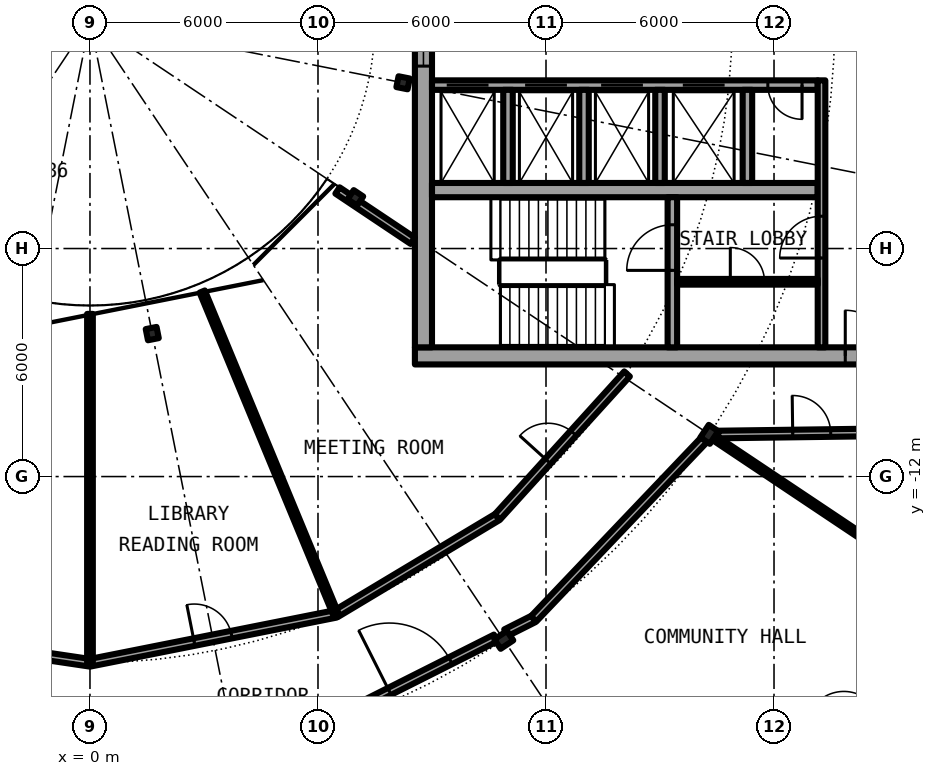
"""IFC4 building model, lengths in metres.
Left out: names, types, materials, properties, quantities, classifications, styles, units other than length and angle.
Written with IfcOpenShell. Run it as: python <this file> out.ifc"""

import sys

from ifc_helpers import new_model, si_unit, direction, frame, frame_2d, origin, origin_2d, place, context, subcontext, project, spatial, rectangle, i_section, extrude, element, fill, save


model = new_model("IFC4")
c1 = context("Model", 3, precision=1e-05, world=origin(), true_north=direction((0.0, 1.0)))
c2 = subcontext(c1, "Body", "Model", "MODEL_VIEW")
j1 = project(units=[si_unit("LENGTHUNIT", "METRE"), si_unit("PLANEANGLEUNIT", "RADIAN")], contexts=[c1])
p1 = place(None, origin())
s1 = spatial("IfcSite", under=j1, at=p1, CompositionType="ELEMENT")
p2 = place(p1, origin())
s2 = spatial("IfcBuilding", under=s1, at=p2, CompositionType="ELEMENT")
p3 = place(p2, frame((0.0, 0.0, 208.5)))
s3 = spatial("IfcBuildingStorey", under=s2, at=p3, CompositionType="ELEMENT", Elevation=208.5)
for number, where, z_axis, x_axis in (
    (1, (10.889, -16.297, 0.0), (0.0, 0.0, 1.0), (0.556, -0.831, 0.0)),
    (2, (16.297, -10.889, 0.0), (0.0, 0.0, 1.0), (0.831, -0.556, 0.0)),
):
    element("IfcColumn", number, at=place(p3, frame(where, z_axis=z_axis, x_axis=x_axis)), inside=s3, PredefinedType="COLUMN", context=c2, shape_type="SweptSolid", body=[
        extrude(i_section(OverallWidth=0.3, OverallDepth=0.4, WebThickness=0.013, FlangeThickness=0.024, FilletRadius=0.027, at=origin_2d()), origin(), (0.0, 0.0, 1.0), 4.2),
    ])
for number, where, z_axis, x_axis in (
    (3, (1.639, -8.239, 0.0), (0.0, 0.0, 1.0), (0.195, -0.981, 0.0)),
    (4, (6.984, -4.667, 0.0), (0.0, 0.0, 1.0), (0.831, -0.556, 0.0)),
    (5, (8.239, -1.639, 0.0), (0.0, 0.0, 1.0), (0.981, -0.195, 0.0)),
):
    element("IfcColumn", number, at=place(p3, frame(where, z_axis=z_axis, x_axis=x_axis)), inside=s3, PredefinedType="COLUMN", context=c2, shape_type="SweptSolid", body=[
        extrude(i_section(OverallWidth=0.3, OverallDepth=0.29, WebThickness=0.009, FlangeThickness=0.014, FilletRadius=0.027, at=origin_2d()), origin(), (0.0, 0.0, 1.0), 4.2),
    ])
p4 = place(p3, frame((19.304, -19.304, 0.0), z_axis=(0.0, 0.0, 1.0), x_axis=(0.634382322723, 0.773019449054, 0.0)))
e6 = element("IfcWall", 6, at=p4, inside=s3, PredefinedType="SOLIDWALL", context=c2, shape_type="SweptSolid", body=[
    extrude(rectangle(XDim=5.352, YDim=0.25, at=frame_2d((2.676, 0.0))), origin(), (0.0, 0.0, 1.0), 3.85),
])
p5 = place(p4, frame((0.841, 0.0, 0.0)))
e7 = element("IfcOpeningElement", 7, at=p5, cuts=e6, PredefinedType="OPENING", context=c2, shape_type="SweptSolid", body=[
    extrude(rectangle(XDim=1.0, YDim=2.2, at=frame_2d((0.5, 1.1))), frame((0.0, 0.135, 0.0), z_axis=(0.0, -1.0, 0.0), x_axis=(1.0, 0.0, 0.0)), (0.0, 0.0, 1.0), 0.27),
])
p6 = place(p4, frame((3.51, 0.0, 0.0)))
e8 = element("IfcOpeningElement", 8, at=p6, cuts=e6, PredefinedType="OPENING", context=c2, shape_type="SweptSolid", body=[
    extrude(rectangle(XDim=1.0, YDim=2.2, at=frame_2d((0.5, 1.1))), frame((0.0, 0.135, 0.0), z_axis=(0.0, -1.0, 0.0), x_axis=(1.0, 0.0, 0.0)), (0.0, 0.0, 1.0), 0.27),
])
p7 = place(p3, frame((8.55, -8.825, 0.0), z_axis=(0.0, 0.0, 1.0), x_axis=(1.0, 0.0, 0.0)))
e9 = element("IfcWall", 9, at=p7, inside=s3, PredefinedType="SHEAR", context=c2, shape_type="SweptSolid", body=[
    extrude(rectangle(XDim=13.5, YDim=0.45, at=frame_2d((6.75, 0.0))), origin(), (0.0, 0.0, 1.0), 4.2),
])
p8 = place(p7, frame((11.325, 0.0, 0.0)))
e10 = element("IfcOpeningElement", 10, at=p8, cuts=e9, PredefinedType="OPENING", context=c2, shape_type="SweptSolid", body=[
    extrude(rectangle(XDim=1.2, YDim=2.3, at=frame_2d((0.6, 1.15))), frame((0.0, 0.235, 0.0), z_axis=(0.0, -1.0, 0.0), x_axis=(1.0, 0.0, 0.0)), (0.0, 0.0, 1.0), 0.47),
])
p9 = place(p3, frame((8.775, -8.6, 0.0), z_axis=(0.0, 0.0, 1.0), x_axis=(0.0, 1.0, 0.0)))
e11 = element("IfcWall", 11, at=p9, inside=s3, PredefinedType="SHEAR", context=c2, shape_type="SweptSolid", body=[
    extrude(rectangle(XDim=17.2, YDim=0.45, at=frame_2d((8.6, 0.0))), origin(), (0.0, 0.0, 1.0), 4.2),
])
p10 = place(p9, frame((7.4, 0.0, 0.1)))
e12 = element("IfcOpeningElement", 12, at=p10, cuts=e11, PredefinedType="OPENING", context=c2, shape_type="SweptSolid", body=[
    extrude(rectangle(XDim=2.4, YDim=2.2, at=frame_2d((1.2, 1.1))), frame((0.0, 0.235, 0.0), z_axis=(0.0, -1.0, 0.0), x_axis=(1.0, 0.0, 0.0)), (0.0, 0.0, 1.0), 0.47),
])
p11 = place(p3, frame((19.15, -1.7, 0.0), z_axis=(0.0, 0.0, 1.0), x_axis=(-1.0, 0.0, 0.0)))
e13 = element("IfcWall", 13, at=p11, inside=s3, PredefinedType="SHEAR", context=c2, shape_type="SweptSolid", body=[
    extrude(rectangle(XDim=10.15, YDim=0.25, at=frame_2d((5.075, 0.0))), origin(), (0.0, 0.0, 1.0), 4.2),
])
p12 = place(p11, frame((8.663, 0.0, 0.0)))
e14 = element("IfcOpeningElement", 14, at=p12, cuts=e13, PredefinedType="OPENING", context=c2, shape_type="SweptSolid", body=[
    extrude(rectangle(XDim=1.1, YDim=2.3, at=frame_2d((0.55, 1.15))), frame((0.0, 0.135, 0.0), z_axis=(0.0, -1.0, 0.0), x_axis=(1.0, 0.0, 0.0)), (0.0, 0.0, 1.0), 0.27),
])
p13 = place(p11, frame((6.6, 0.0, 0.0)))
e15 = element("IfcOpeningElement", 15, at=p13, cuts=e13, PredefinedType="OPENING", context=c2, shape_type="SweptSolid", body=[
    extrude(rectangle(XDim=1.1, YDim=2.3, at=frame_2d((0.55, 1.15))), frame((0.0, 0.135, 0.0), z_axis=(0.0, -1.0, 0.0), x_axis=(1.0, 0.0, 0.0)), (0.0, 0.0, 1.0), 0.27),
])
p14 = place(p11, frame((4.6, 0.0, 0.0)))
e16 = element("IfcOpeningElement", 16, at=p14, cuts=e13, PredefinedType="OPENING", context=c2, shape_type="SweptSolid", body=[
    extrude(rectangle(XDim=1.1, YDim=2.3, at=frame_2d((0.55, 1.15))), frame((0.0, 0.135, 0.0), z_axis=(0.0, -1.0, 0.0), x_axis=(1.0, 0.0, 0.0)), (0.0, 0.0, 1.0), 0.27),
])
p15 = place(p11, frame((2.45, 0.0, 0.0)))
e17 = element("IfcOpeningElement", 17, at=p15, cuts=e13, PredefinedType="OPENING", context=c2, shape_type="SweptSolid", body=[
    extrude(rectangle(XDim=1.1, YDim=2.3, at=frame_2d((0.55, 1.15))), frame((0.0, 0.135, 0.0), z_axis=(0.0, -1.0, 0.0), x_axis=(1.0, 0.0, 0.0)), (0.0, 0.0, 1.0), 0.27),
])
p16 = place(p11, frame((0.413, 0.0, 0.0)))
e18 = element("IfcOpeningElement", 18, at=p16, cuts=e13, PredefinedType="OPENING", context=c2, shape_type="SweptSolid", body=[
    extrude(rectangle(XDim=0.9, YDim=2.3, at=frame_2d((0.45, 1.15))), frame((0.0, 0.135, 0.0), z_axis=(0.0, -1.0, 0.0), x_axis=(1.0, 0.0, 0.0)), (0.0, 0.0, 1.0), 0.27),
])
p17 = place(p3, frame((9.0, -4.462, 0.0), z_axis=(0.0, 0.0, 1.0), x_axis=(1.0, 0.0, 0.0)))
e19 = element("IfcWall", 19, at=p17, inside=s3, PredefinedType="SHEAR", context=c2, shape_type="SweptSolid", body=[
    extrude(rectangle(XDim=10.15, YDim=0.375, at=frame_2d((5.075, 0.0))), origin(), (0.0, 0.0, 1.0), 4.2),
])
p18 = place(p3, frame((15.325, -8.6, 0.0), z_axis=(0.0, 0.0, 1.0), x_axis=(0.0, 1.0, 0.0)))
e20 = element("IfcWall", 20, at=p18, inside=s3, PredefinedType="SHEAR", context=c2, shape_type="SweptSolid", body=[
    extrude(rectangle(XDim=3.95, YDim=0.25, at=frame_2d((1.975, 0.0))), origin(), (0.0, 0.0, 1.0), 4.2),
])
p19 = place(p18, frame((2.025, 0.0, 0.0)))
e21 = element("IfcOpeningElement", 21, at=p19, cuts=e20, PredefinedType="OPENING", context=c2, shape_type="SweptSolid", body=[
    extrude(rectangle(XDim=1.2, YDim=2.3, at=frame_2d((0.6, 1.15))), frame((0.0, 0.135, 0.0), z_axis=(0.0, -1.0, 0.0), x_axis=(1.0, 0.0, 0.0)), (0.0, 0.0, 1.0), 0.27),
])
for number, where, z_axis, x_axis in (
    (22, (15.0, -1.825, 0.0), (0.0, 0.0, 1.0), (0.0, -1.0, 0.0)),
    (23, (17.3, -1.825, 0.0), (0.0, 0.0, 1.0), (0.0, -1.0, 0.0)),
):
    element("IfcWall", number, at=place(p3, frame(where, z_axis=z_axis, x_axis=x_axis)), inside=s3, PredefinedType="SOLIDWALL", context=c2, shape_type="SweptSolid", body=[
        extrude(rectangle(XDim=2.45, YDim=0.25, at=frame_2d((1.225, 0.0))), origin(), (0.0, 0.0, 1.0), 3.85),
    ])
p20 = place(p3, frame((19.25, -8.6, 0.0), z_axis=(0.0, 0.0, 1.0), x_axis=(0.0, 1.0, 0.0)))
e24 = element("IfcWall", 24, at=p20, inside=s3, PredefinedType="SOLIDWALL", context=c2, shape_type="SweptSolid", body=[
    extrude(rectangle(XDim=7.025, YDim=0.2, at=frame_2d((3.513, 0.0))), origin(), (0.0, 0.0, 1.0), 3.85),
])
p21 = place(p20, frame((2.35, 0.0, 0.0)))
e25 = element("IfcOpeningElement", 25, at=p21, cuts=e24, PredefinedType="OPENING", context=c2, shape_type="SweptSolid", body=[
    extrude(rectangle(XDim=1.1, YDim=2.3, at=frame_2d((0.55, 1.15))), frame((0.0, 0.11, 0.0), z_axis=(0.0, -1.0, 0.0), x_axis=(1.0, 0.0, 0.0)), (0.0, 0.0, 1.0), 0.22),
])
for number, where, z_axis, x_axis in (
    (26, (11.0, -1.825, 0.0), (0.0, 0.0, 1.0), (0.0, -1.0, 0.0)),
    (27, (13.0, -1.825, 0.0), (0.0, 0.0, 1.0), (0.0, -1.0, 0.0)),
):
    element("IfcWall", number, at=place(p3, frame(where, z_axis=z_axis, x_axis=x_axis)), inside=s3, PredefinedType="SOLIDWALL", context=c2, shape_type="SweptSolid", body=[
        extrude(rectangle(XDim=2.45, YDim=0.25, at=frame_2d((1.225, 0.0))), origin(), (0.0, 0.0, 1.0), 3.85),
    ])
p22 = place(p3, frame((15.45, -6.875, 0.0), z_axis=(0.0, 0.0, 1.0), x_axis=(1.0, 0.0, 0.0)))
e28 = element("IfcWall", 28, at=p22, inside=s3, PredefinedType="PARTITIONING", context=c2, shape_type="SweptSolid", body=[
    extrude(rectangle(XDim=3.7, YDim=0.15, at=frame_2d((1.85, 0.0))), origin(), (0.0, 0.0, 1.0), 3.85),
])
p23 = place(p22, frame((1.4, 0.0, 0.0)))
e29 = element("IfcOpeningElement", 29, at=p23, cuts=e28, PredefinedType="OPENING", context=c2, shape_type="SweptSolid", body=[
    extrude(rectangle(XDim=0.9, YDim=2.3, at=frame_2d((0.45, 1.15))), frame((0.0, 0.085, 0.0), z_axis=(0.0, -1.0, 0.0), x_axis=(1.0, 0.0, 0.0)), (0.0, 0.0, 1.0), 0.17),
])
p24 = place(p3, frame((5.69, -18.756, 0.0), z_axis=(0.0, 0.0, 1.0), x_axis=(0.893242938285, 0.449574302206, 0.0)))
e30 = element("IfcWall", 30, at=p24, inside=s3, PredefinedType="PARTITIONING", context=c2, shape_type="SweptSolid", body=[
    extrude(rectangle(XDim=5.581, YDim=0.2, at=frame_2d((2.791, 0.0))), origin(), (0.0, 0.0, 1.0), 3.6),
])
p25 = place(p24, frame((2.451, 0.0, 0.0)))
e31 = element("IfcOpeningElement", 31, at=p25, cuts=e30, PredefinedType="OPENING", context=c2, shape_type="SweptSolid", body=[
    extrude(rectangle(XDim=1.8, YDim=2.3, at=frame_2d((0.9, 1.15))), frame((0.0, 0.11, 0.0), z_axis=(0.0, -1.0, 0.0), x_axis=(1.0, 0.0, 0.0)), (0.0, 0.0, 1.0), 0.22),
])
p26 = place(p3, frame((10.945, -16.111, 0.0), z_axis=(0.0, 0.0, 1.0), x_axis=(0.893110817984, 0.449836711263, 0.0)))
e32 = element("IfcWall", 32, at=p26, inside=s3, PredefinedType="PARTITIONING", context=c2, shape_type="SweptSolid", body=[
    extrude(rectangle(XDim=0.818, YDim=0.2, at=frame_2d((0.409, 0.0))), origin(), (0.0, 0.0, 1.0), 3.85),
])
p27 = place(p3, frame((11.676, -15.743, 0.0), z_axis=(0.0, 0.0, 1.0), x_axis=(0.689484820725, 0.724300132535, 0.0)))
e33 = element("IfcWall", 33, at=p27, inside=s3, PredefinedType="PARTITIONING", context=c2, shape_type="SweptSolid", body=[
    extrude(rectangle(XDim=6.55, YDim=0.2, at=frame_2d((3.275, 0.0))), origin(), (0.0, 0.0, 1.0), 3.6),
])
p28 = place(p3, frame((-4.906, -16.172, 0.0), z_axis=(0.0, 0.0, 1.0), x_axis=(0.989175164373, -0.146739545409, 0.0)))
e34 = element("IfcWall", 34, at=p28, inside=s3, PredefinedType="PARTITIONING", context=c2, shape_type="SweptSolid", body=[
    extrude(rectangle(XDim=4.96, YDim=0.2, at=frame_2d((2.48, 0.0))), origin(), (0.0, 0.0, 1.0), 3.85),
])
p29 = place(p28, frame((1.98, 0.0, 0.0)))
e35 = element("IfcOpeningElement", 35, at=p29, cuts=e34, PredefinedType="OPENING", context=c2, shape_type="SweptSolid", body=[
    extrude(rectangle(XDim=1.0, YDim=2.3, at=frame_2d((0.5, 1.15))), frame((0.0, 0.11, 0.0), z_axis=(0.0, -1.0, 0.0), x_axis=(1.0, 0.0, 0.0)), (0.0, 0.0, 1.0), 0.22),
])
p30 = place(p3, frame((6.467, -15.614, 0.0), z_axis=(0.0, 0.0, 1.0), x_axis=(0.857696997328, 0.514155483074, 0.0)))
e36 = element("IfcWall", 36, at=p30, inside=s3, PredefinedType="PARTITIONING", context=c2, shape_type="SweptSolid", body=[
    extrude(rectangle(XDim=4.96, YDim=0.2, at=frame_2d((2.48, 0.0))), origin(), (0.0, 0.0, 1.0), 3.85),
])
p31 = place(p3, frame((10.721, -13.064, 0.0), z_axis=(0.0, 0.0, 1.0), x_axis=(0.671634030197, 0.740883074095, 0.0)))
e37 = element("IfcWall", 37, at=p31, inside=s3, PredefinedType="PARTITIONING", context=c2, shape_type="SweptSolid", body=[
    extrude(rectangle(XDim=5.08, YDim=0.2, at=frame_2d((2.54, 0.0))), origin(), (0.0, 0.0, 1.0), 3.85),
])
p32 = place(p31, frame((1.98, 0.0, 0.0)))
e38 = element("IfcOpeningElement", 38, at=p32, cuts=e37, PredefinedType="OPENING", context=c2, shape_type="SweptSolid", body=[
    extrude(rectangle(XDim=1.0, YDim=2.3, at=frame_2d((0.5, 1.15))), frame((0.0, 0.11, 0.0), z_axis=(0.0, -1.0, 0.0), x_axis=(1.0, 0.0, 0.0)), (0.0, 0.0, 1.0), 0.22),
])
p33 = place(p3, frame((0.0, -16.9, 0.0), z_axis=(0.0, 0.0, 1.0), x_axis=(0.980799374359, 0.195019453537, 0.0)))
e39 = element("IfcWall", 39, at=p33, inside=s3, PredefinedType="PARTITIONING", context=c2, shape_type="SweptSolid", body=[
    extrude(rectangle(XDim=6.594, YDim=0.2, at=frame_2d((3.297, 0.0))), origin(), (0.0, 0.0, 1.0), 3.85),
])
p34 = place(p33, frame((2.797, 0.0, 0.0)))
e40 = element("IfcOpeningElement", 40, at=p34, cuts=e39, PredefinedType="OPENING", context=c2, shape_type="SweptSolid", body=[
    extrude(rectangle(XDim=1.0, YDim=2.3, at=frame_2d((0.5, 1.15))), frame((0.0, 0.11, 0.0), z_axis=(0.0, -1.0, 0.0), x_axis=(1.0, 0.0, 0.0)), (0.0, 0.0, 1.0), 0.22),
])
p35 = place(p3, frame((16.534, -10.894, 0.0), z_axis=(0.0, 0.0, 1.0), x_axis=(0.999909707888, 0.013437859594, 0.0)))
e41 = element("IfcWall", 41, at=p35, inside=s3, PredefinedType="PARTITIONING", context=c2, shape_type="SweptSolid", body=[
    extrude(rectangle(XDim=5.142, YDim=0.2, at=frame_2d((2.571, 0.0))), origin(), (0.0, 0.0, 1.0), 3.85),
])
p36 = place(p35, frame((1.958, 0.0, 0.0)))
e42 = element("IfcOpeningElement", 42, at=p36, cuts=e41, PredefinedType="OPENING", context=c2, shape_type="SweptSolid", body=[
    extrude(rectangle(XDim=1.0, YDim=2.3, at=frame_2d((0.5, 1.15))), frame((0.0, 0.11, 0.0), z_axis=(0.0, -1.0, 0.0), x_axis=(1.0, 0.0, 0.0)), (0.0, 0.0, 1.0), 0.22),
])
p37 = place(p3, frame((6.513, -4.472, 0.0), z_axis=(0.0, 0.0, 1.0), x_axis=(0.831403409976, -0.555669299026, 0.0)))
e43 = element("IfcWall", 43, at=p37, inside=s3, PredefinedType="PARTITIONING", context=c2, shape_type="SweptSolid", body=[
    extrude(rectangle(XDim=2.383, YDim=0.2, at=frame_2d((1.191, 0.0))), origin(), (0.0, 0.0, 1.0), 3.85),
])
p38 = place(p3, frame((0.0, -16.9, 0.0), z_axis=(0.0, 0.0, 1.0), x_axis=(0.0, 1.0, 0.0)))
e44 = element("IfcWall", 44, at=p38, inside=s3, PredefinedType="PARTITIONING", context=c2, shape_type="SweptSolid", body=[
    extrude(rectangle(XDim=9.18, YDim=0.15, at=frame_2d((4.59, 0.0))), origin(), (0.0, 0.0, 1.0), 3.85),
])
p39 = place(p3, frame((2.954, -7.132, 0.0), z_axis=(0.0, 0.0, 1.0), x_axis=(0.382646942224, -0.923894646378, 0.0)))
e45 = element("IfcWall", 45, at=p39, inside=s3, PredefinedType="PARTITIONING", context=c2, shape_type="SweptSolid", body=[
    extrude(rectangle(XDim=9.181, YDim=0.15, at=frame_2d((4.59, 0.0))), origin(), (0.0, 0.0, 1.0), 3.85),
])
p40 = place(p3, frame((16.461, -11.003, 0.0), z_axis=(0.0, 0.0, 1.0), x_axis=(0.831418274402, -0.555647057933, 0.0)))
e46 = element("IfcWall", 46, at=p40, inside=s3, PredefinedType="PARTITIONING", context=c2, shape_type="SweptSolid", body=[
    extrude(rectangle(XDim=7.375, YDim=0.15, at=frame_2d((3.688, 0.0))), origin(), (0.0, 0.0, 1.0), 3.85),
])
p41 = place(p12, origin())
e47 = element("IfcDoor", 47, at=p41, inside=s3, OperationType="DOUBLE_DOOR_SLIDING", PredefinedType="DOOR", context=c2, shape_type="SweptSolid", body=[
    extrude(rectangle(XDim=1.1, YDim=2.3, at=frame_2d((0.55, 1.15))), frame((0.0, 0.025, 0.0), z_axis=(0.0, -1.0, 0.0), x_axis=(1.0, 0.0, 0.0)), (0.0, 0.0, 1.0), 0.05),
])
fill(e14, e47)
p42 = place(p13, origin())
e48 = element("IfcDoor", 48, at=p42, inside=s3, OperationType="DOUBLE_DOOR_SLIDING", PredefinedType="DOOR", context=c2, shape_type="SweptSolid", body=[
    extrude(rectangle(XDim=1.1, YDim=2.3, at=frame_2d((0.55, 1.15))), frame((0.0, 0.025, 0.0), z_axis=(0.0, -1.0, 0.0), x_axis=(1.0, 0.0, 0.0)), (0.0, 0.0, 1.0), 0.05),
])
fill(e15, e48)
p43 = place(p14, origin())
e49 = element("IfcDoor", 49, at=p43, inside=s3, OperationType="DOUBLE_DOOR_SLIDING", PredefinedType="DOOR", context=c2, shape_type="SweptSolid", body=[
    extrude(rectangle(XDim=1.1, YDim=2.3, at=frame_2d((0.55, 1.15))), frame((0.0, 0.025, 0.0), z_axis=(0.0, -1.0, 0.0), x_axis=(1.0, 0.0, 0.0)), (0.0, 0.0, 1.0), 0.05),
])
fill(e16, e49)
p44 = place(p15, origin())
e50 = element("IfcDoor", 50, at=p44, inside=s3, OperationType="DOUBLE_DOOR_SLIDING", PredefinedType="DOOR", context=c2, shape_type="SweptSolid", body=[
    extrude(rectangle(XDim=1.1, YDim=2.3, at=frame_2d((0.55, 1.15))), frame((0.0, 0.025, 0.0), z_axis=(0.0, -1.0, 0.0), x_axis=(1.0, 0.0, 0.0)), (0.0, 0.0, 1.0), 0.05),
])
fill(e17, e50)
p45 = place(p16, origin())
e51 = element("IfcDoor", 51, at=p45, inside=s3, OperationType="SINGLE_SWING_RIGHT", PredefinedType="DOOR", context=c2, shape_type="SweptSolid", body=[
    extrude(rectangle(XDim=0.9, YDim=2.3, at=frame_2d((0.45, 1.15))), frame((0.0, 0.025, 0.0), z_axis=(0.0, -1.0, 0.0), x_axis=(1.0, 0.0, 0.0)), (0.0, 0.0, 1.0), 0.05),
])
fill(e18, e51)
p46 = place(p23, origin())
e52 = element("IfcDoor", 52, at=p46, inside=s3, OperationType="SINGLE_SWING_LEFT", PredefinedType="DOOR", context=c2, shape_type="SweptSolid", body=[
    extrude(rectangle(XDim=0.9, YDim=2.3, at=frame_2d((0.45, 1.15))), frame((0.0, 0.025, 0.0), z_axis=(0.0, -1.0, 0.0), x_axis=(1.0, 0.0, 0.0)), (0.0, 0.0, 1.0), 0.05),
])
fill(e29, e52)
p47 = place(p19, origin())
e53 = element("IfcDoor", 53, at=p47, inside=s3, OperationType="SINGLE_SWING_LEFT", PredefinedType="DOOR", context=c2, shape_type="SweptSolid", body=[
    extrude(rectangle(XDim=1.2, YDim=2.3, at=frame_2d((0.6, 1.15))), frame((0.0, 0.025, 0.0), z_axis=(0.0, -1.0, 0.0), x_axis=(1.0, 0.0, 0.0)), (0.0, 0.0, 1.0), 0.05),
])
fill(e21, e53)
p48 = place(p21, origin())
e54 = element("IfcDoor", 54, at=p48, inside=s3, OperationType="SINGLE_SWING_RIGHT", PredefinedType="DOOR", context=c2, shape_type="SweptSolid", body=[
    extrude(rectangle(XDim=1.1, YDim=2.3, at=frame_2d((0.55, 1.15))), frame((0.0, 0.025, 0.0), z_axis=(0.0, -1.0, 0.0), x_axis=(1.0, 0.0, 0.0)), (0.0, 0.0, 1.0), 0.05),
])
fill(e25, e54)
p49 = place(p8, origin())
e55 = element("IfcDoor", 55, at=p49, inside=s3, OperationType="SINGLE_SWING_LEFT", PredefinedType="DOOR", context=c2, shape_type="SweptSolid", body=[
    extrude(rectangle(XDim=1.2, YDim=2.3, at=frame_2d((0.6, 1.15))), frame((0.0, 0.025, 0.0), z_axis=(0.0, -1.0, 0.0), x_axis=(1.0, 0.0, 0.0)), (0.0, 0.0, 1.0), 0.05),
])
fill(e10, e55)
p50 = place(p10, origin())
e56 = element("IfcWindow", 56, at=p50, inside=s3, PartitioningType="SINGLE_PANEL", PredefinedType="WINDOW", context=c2, shape_type="SweptSolid", body=[
    extrude(rectangle(XDim=2.4, YDim=2.2, at=frame_2d((1.2, 1.1))), frame((0.0, 0.03, 0.0), z_axis=(0.0, -1.0, 0.0), x_axis=(1.0, 0.0, 0.0)), (0.0, 0.0, 1.0), 0.06),
])
fill(e12, e56)
p51 = place(p25, origin())
e57 = element("IfcDoor", 57, at=p51, inside=s3, OperationType="DOUBLE_DOOR_SINGLE_SWING", PredefinedType="DOOR", context=c2, shape_type="SweptSolid", body=[
    extrude(rectangle(XDim=1.8, YDim=2.3, at=frame_2d((0.9, 1.15))), frame((0.0, 0.025, 0.0), z_axis=(0.0, -1.0, 0.0), x_axis=(1.0, 0.0, 0.0)), (0.0, 0.0, 1.0), 0.05),
])
fill(e31, e57)
p52 = place(p34, origin())
e58 = element("IfcDoor", 58, at=p52, inside=s3, OperationType="SINGLE_SWING_LEFT", PredefinedType="DOOR", context=c2, shape_type="SweptSolid", body=[
    extrude(rectangle(XDim=1.0, YDim=2.3, at=frame_2d((0.5, 1.15))), frame((0.0, 0.025, 0.0), z_axis=(0.0, -1.0, 0.0), x_axis=(1.0, 0.0, 0.0)), (0.0, 0.0, 1.0), 0.05),
])
fill(e40, e58)
p53 = place(p32, origin())
e59 = element("IfcDoor", 59, at=p53, inside=s3, OperationType="SINGLE_SWING_RIGHT", PredefinedType="DOOR", context=c2, shape_type="SweptSolid", body=[
    extrude(rectangle(XDim=1.0, YDim=2.3, at=frame_2d((0.5, 1.15))), frame((0.0, 0.025, 0.0), z_axis=(0.0, -1.0, 0.0), x_axis=(1.0, 0.0, 0.0)), (0.0, 0.0, 1.0), 0.05),
])
fill(e38, e59)
p54 = place(p36, origin())
e60 = element("IfcDoor", 60, at=p54, inside=s3, OperationType="SINGLE_SWING_LEFT", PredefinedType="DOOR", context=c2, shape_type="SweptSolid", body=[
    extrude(rectangle(XDim=1.0, YDim=2.3, at=frame_2d((0.5, 1.15))), frame((0.0, 0.025, 0.0), z_axis=(0.0, -1.0, 0.0), x_axis=(1.0, 0.0, 0.0)), (0.0, 0.0, 1.0), 0.05),
])
fill(e42, e60)
save(model, sys.argv[1])
